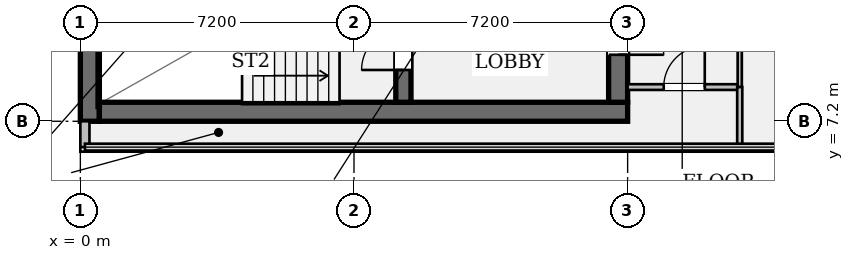
"""IFC4 building model, lengths in metres.
Left out: names, types, materials, properties, quantities, classifications, styles, units other than length and angle.
Written with IfcOpenShell. Run it as: python <this file> out.ifc"""

import sys

from ifc_helpers import new_model, si_unit, direction, frame, frame_2d, origin, place, context, subcontext, project, spatial, rectangle, extrude, element, fill, save


model = new_model("IFC4")
c1 = context("Model", 3, precision=1e-05, world=origin(), true_north=direction((0.0, 1.0)))
c2 = subcontext(c1, "Body", "Model", "MODEL_VIEW")
j1 = project(units=[si_unit("LENGTHUNIT", "METRE"), si_unit("PLANEANGLEUNIT", "RADIAN")], contexts=[c1])
p1 = place(None, origin())
s1 = spatial("IfcSite", under=j1, at=p1, CompositionType="ELEMENT")
p2 = place(p1, origin())
s2 = spatial("IfcBuilding", under=s1, at=p2, CompositionType="ELEMENT")
p3 = place(p2, frame((0.0, 0.0, 265.65)))
s3 = spatial("IfcBuildingStorey", under=s2, at=p3, CompositionType="ELEMENT", Elevation=265.65)
p4 = place(p3, frame((0.25, 7.2, 0.0), z_axis=(0.0, 0.0, 1.0), x_axis=(0.0, 1.0, 0.0)))
e1 = element("IfcWall", 1, at=p4, inside=s3, PredefinedType="SHEAR", context=c2, shape_type="SweptSolid", body=[
    extrude(rectangle(XDim=28.8, YDim=0.5, at=frame_2d((14.4, 0.0))), origin(), (0.0, 0.0, 1.0), 3.24),
])
p5 = place(p3, frame((0.5, 7.45, 0.0), z_axis=(0.0, 0.0, 1.0), x_axis=(1.0, 0.0, 0.0)))
e2 = element("IfcWall", 2, at=p5, inside=s3, PredefinedType="SHEAR", context=c2, shape_type="SweptSolid", body=[
    extrude(rectangle(XDim=13.9, YDim=0.5, at=frame_2d((6.95, 0.0))), origin(), (0.0, 0.0, 1.0), 3.24),
])
p6 = place(p3, frame((14.15, 35.5, 0.0), z_axis=(0.0, 0.0, 1.0), x_axis=(0.0, -1.0, 0.0)))
e3 = element("IfcWall", 3, at=p6, inside=s3, PredefinedType="SHEAR", context=c2, shape_type="SweptSolid", body=[
    extrude(rectangle(XDim=27.8, YDim=0.5, at=frame_2d((13.9, 0.0))), origin(), (0.0, 0.0, 1.0), 3.24),
])
p7 = place(p6, frame((1.4, 0.0, 0.0)))
e4 = element("IfcOpeningElement", 4, at=p7, cuts=e3, PredefinedType="OPENING", context=c2, shape_type="SweptSolid", body=[
    extrude(rectangle(XDim=1.2, YDim=2.15, at=frame_2d((0.6, 1.075))), frame((0.0, 0.262, 0.0), z_axis=(0.0, -1.0, 0.0), x_axis=(1.0, 0.0, 0.0)), (0.0, 0.0, 1.0), 0.524),
])
p8 = place(p6, frame((25.35, 0.0, 0.0)))
e5 = element("IfcOpeningElement", 5, at=p8, cuts=e3, PredefinedType="OPENING", context=c2, shape_type="SweptSolid", body=[
    extrude(rectangle(XDim=1.2, YDim=2.15, at=frame_2d((0.6, 1.075))), frame((0.0, 0.262, 0.0), z_axis=(0.0, -1.0, 0.0), x_axis=(1.0, 0.0, 0.0)), (0.0, 0.0, 1.0), 0.524),
])
p9 = place(p6, frame((14.7, 0.0, 0.0)))
e6 = element("IfcOpeningElement", 6, at=p9, cuts=e3, PredefinedType="OPENING", context=c2, shape_type="SweptSolid", body=[
    extrude(rectangle(XDim=1.6, YDim=2.2, at=frame_2d((0.8, 1.1))), frame((0.0, 0.262, 0.0), z_axis=(0.0, -1.0, 0.0), x_axis=(1.0, 0.0, 0.0)), (0.0, 0.0, 1.0), 0.524),
])
p10 = place(p3, frame((8.5, 7.7, 0.0), z_axis=(0.0, 0.0, 1.0), x_axis=(0.0, 1.0, 0.0)))
e7 = element("IfcWall", 7, at=p10, inside=s3, PredefinedType="SHEAR", context=c2, shape_type="SweptSolid", body=[
    extrude(rectangle(XDim=3.78, YDim=0.4, at=frame_2d((1.89, 0.0))), origin(), (0.0, 0.0, 1.0), 3.24),
])
p11 = place(p10, frame((0.85, 0.0, 0.0)))
e8 = element("IfcOpeningElement", 8, at=p11, cuts=e7, PredefinedType="OPENING", context=c2, shape_type="SweptSolid", body=[
    extrude(rectangle(XDim=1.1, YDim=2.15, at=frame_2d((0.55, 1.075))), frame((0.0, 0.212, 0.0), z_axis=(0.0, -1.0, 0.0), x_axis=(1.0, 0.0, 0.0)), (0.0, 0.0, 1.0), 0.424),
])
p12 = place(p3, frame((0.12, 6.52, 0.0), z_axis=(0.0, 0.0, 1.0), x_axis=(0.0, 1.0, 0.0)))
e9 = element("IfcWall", 9, at=p12, inside=s3, PredefinedType="STANDARD", context=c2, shape_type="SweptSolid", body=[
    extrude(rectangle(XDim=0.68, YDim=0.24, at=frame_2d((0.34, 0.0))), origin(), (0.0, 0.0, 1.0), 3.24),
])
p13 = place(p3, frame((14.4, 8.1, 0.0), z_axis=(0.0, 0.0, 1.0), x_axis=(1.0, 0.0, 0.0)))
e10 = element("IfcWall", 10, at=p13, inside=s3, PredefinedType="PARTITIONING", context=c2, shape_type="SweptSolid", body=[
    extrude(rectangle(XDim=2.95, YDim=0.15, at=frame_2d((1.475, 0.0))), origin(), (0.0, 0.0, 1.0), 3.24),
])
p14 = place(p13, frame((0.95, 0.0, 0.0)))
e11 = element("IfcOpeningElement", 11, at=p14, cuts=e10, PredefinedType="OPENING", context=c2, shape_type="SweptSolid", body=[
    extrude(rectangle(XDim=1.08, YDim=2.15, at=frame_2d((0.54, 1.075))), frame((0.0, 0.087, 0.0), z_axis=(0.0, -1.0, 0.0), x_axis=(1.0, 0.0, 0.0)), (0.0, 0.0, 1.0), 0.174),
])
p15 = place(p3, frame((17.35, 8.1, 0.0), z_axis=(0.0, 0.0, 1.0), x_axis=(0.0, 1.0, 0.0)))
e12 = element("IfcWall", 12, at=p15, inside=s3, PredefinedType="PARTITIONING", context=c2, shape_type="SweptSolid", body=[
    extrude(rectangle(XDim=9.8, YDim=0.11, at=frame_2d((4.9, 0.0))), origin(), (0.0, 0.0, 1.0), 2.676),
])
p16 = place(p3, frame((17.35, 6.52, 0.0), z_axis=(0.0, 0.0, 1.0), x_axis=(0.0, 1.0, 0.0)))
e13 = element("IfcWall", 13, at=p16, inside=s3, PredefinedType="PARTITIONING", context=c2, shape_type="SweptSolid", body=[
    extrude(rectangle(XDim=1.58, YDim=0.135, at=frame_2d((0.79, 0.0))), origin(), (0.0, 0.0, 1.0), 3.24),
])
p17 = place(p11, origin())
e14 = element("IfcDoor", 14, at=p17, inside=s3, OperationType="SINGLE_SWING_LEFT", PredefinedType="DOOR", context=c2, shape_type="SweptSolid", body=[
    extrude(rectangle(XDim=1.1, YDim=2.15, at=frame_2d((0.55, 1.075))), frame((0.0, 0.025, 0.0), z_axis=(0.0, -1.0, 0.0), x_axis=(1.0, 0.0, 0.0)), (0.0, 0.0, 1.0), 0.05),
])
fill(e8, e14)
p18 = place(p8, origin())
e15 = element("IfcDoor", 15, at=p18, inside=s3, OperationType="SINGLE_SWING_RIGHT", PredefinedType="DOOR", context=c2, shape_type="SweptSolid", body=[
    extrude(rectangle(XDim=1.2, YDim=2.15, at=frame_2d((0.6, 1.075))), frame((0.0, 0.025, 0.0), z_axis=(0.0, -1.0, 0.0), x_axis=(1.0, 0.0, 0.0)), (0.0, 0.0, 1.0), 0.05),
])
fill(e5, e15)
p19 = place(p14, origin())
e16 = element("IfcDoor", 16, at=p19, inside=s3, OperationType="SINGLE_SWING_RIGHT", PredefinedType="DOOR", context=c2, shape_type="SweptSolid", body=[
    extrude(rectangle(XDim=1.08, YDim=2.15, at=frame_2d((0.54, 1.075))), frame((0.0, 0.025, 0.0), z_axis=(0.0, -1.0, 0.0), x_axis=(1.0, 0.0, 0.0)), (0.0, 0.0, 1.0), 0.05),
])
fill(e11, e16)
save(model, sys.argv[1])
